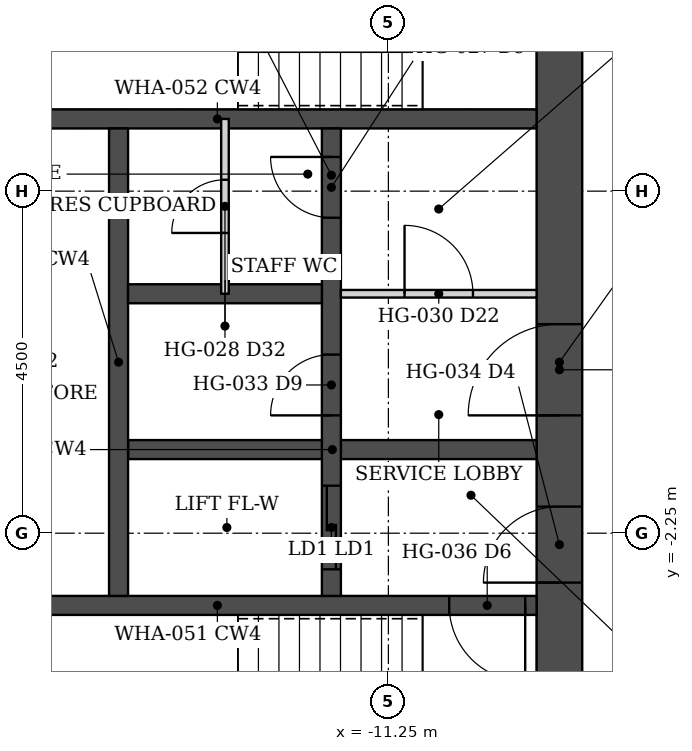
"""IFC4 building model, lengths in metres.
Left out: names, types, materials, properties, quantities, classifications, styles, units other than length and angle.
Written with IfcOpenShell. Run it as: python <this file> out.ifc"""

import sys

from ifc_helpers import new_model, si_unit, direction, frame, frame_2d, origin, place, context, subcontext, project, spatial, rectangle, extrude, element, fill, save


model = new_model("IFC4")
c1 = context("Model", 3, precision=1e-05, world=origin(), true_north=direction((0.0, 1.0)))
c2 = subcontext(c1, "Body", "Model", "MODEL_VIEW")
j1 = project(units=[si_unit("LENGTHUNIT", "METRE"), si_unit("PLANEANGLEUNIT", "RADIAN")], contexts=[c1])
p1 = place(None, origin())
s1 = spatial("IfcSite", under=j1, at=p1, CompositionType="ELEMENT")
p2 = place(p1, origin())
s2 = spatial("IfcBuilding", under=s1, at=p2, CompositionType="ELEMENT")
p3 = place(p2, frame((0.0, 0.0, 186.8)))
s3 = spatial("IfcBuildingStorey", under=s2, at=p3, CompositionType="ELEMENT", Elevation=186.8)
p4 = place(p3, frame((-9.0, -6.45, 0.0), z_axis=(0.0, 0.0, 1.0), x_axis=(0.0, 1.0, 0.0)))
e1 = element("IfcWall", 1, at=p4, inside=s3, PredefinedType="SHEAR", context=c2, shape_type="SweptSolid", body=[
    extrude(rectangle(XDim=12.9, YDim=0.6, at=frame_2d((6.45, 0.0))), origin(), (0.0, 0.0, 1.0), 3.6),
])
p5 = place(p4, frame((3.55, 0.0, 0.0)))
e2 = element("IfcOpeningElement", 2, at=p5, cuts=e1, PredefinedType="OPENING", context=c2, shape_type="SweptSolid", body=[
    extrude(rectangle(XDim=1.0, YDim=2.1, at=frame_2d((0.5, 1.05))), frame((0.0, 0.31, 0.0), z_axis=(0.0, -1.0, 0.0), x_axis=(1.0, 0.0, 0.0)), (0.0, 0.0, 1.0), 0.62),
])
p6 = place(p4, frame((5.75, 0.0, 0.0)))
e3 = element("IfcOpeningElement", 3, at=p6, cuts=e1, PredefinedType="OPENING", context=c2, shape_type="SweptSolid", body=[
    extrude(rectangle(XDim=1.2, YDim=2.1, at=frame_2d((0.6, 1.05))), frame((0.0, 0.31, 0.0), z_axis=(0.0, -1.0, 0.0), x_axis=(1.0, 0.0, 0.0)), (0.0, 0.0, 1.0), 0.62),
])
p7 = place(p4, frame((10.85, 0.0, 0.0)))
e4 = element("IfcOpeningElement", 4, at=p7, cuts=e1, PredefinedType="OPENING", context=c2, shape_type="SweptSolid", body=[
    extrude(rectangle(XDim=1.0, YDim=2.1, at=frame_2d((0.5, 1.05))), frame((0.0, 0.31, 0.0), z_axis=(0.0, -1.0, 0.0), x_axis=(1.0, 0.0, 0.0)), (0.0, 0.0, 1.0), 0.62),
])
p8 = place(p3, frame((-9.3, -3.2, 0.0), z_axis=(0.0, 0.0, 1.0), x_axis=(-1.0, 0.0, 0.0)))
e5 = element("IfcWall", 5, at=p8, inside=s3, PredefinedType="SHEAR", context=c2, shape_type="SweptSolid", body=[
    extrude(rectangle(XDim=8.4, YDim=0.25, at=frame_2d((4.2, 0.0))), origin(), (0.0, 0.0, 1.0), 3.6),
])
p9 = place(p8, frame((0.15, 0.0, 0.0)))
e6 = element("IfcOpeningElement", 6, at=p9, cuts=e5, PredefinedType="OPENING", context=c2, shape_type="SweptSolid", body=[
    extrude(rectangle(XDim=1.0, YDim=2.1, at=frame_2d((0.5, 1.05))), frame((0.0, 0.135, 0.0), z_axis=(0.0, -1.0, 0.0), x_axis=(1.0, 0.0, 0.0)), (0.0, 0.0, 1.0), 0.27),
])
p10 = place(p3, frame((-9.3, 3.2, 0.0), z_axis=(0.0, 0.0, 1.0), x_axis=(-1.0, 0.0, 0.0)))
e7 = element("IfcWall", 7, at=p10, inside=s3, PredefinedType="SHEAR", context=c2, shape_type="SweptSolid", body=[
    extrude(rectangle(XDim=8.4, YDim=0.25, at=frame_2d((4.2, 0.0))), origin(), (0.0, 0.0, 1.0), 3.6),
])
p11 = place(p3, frame((-9.3, -1.15, 0.0), z_axis=(0.0, 0.0, 1.0), x_axis=(-1.0, 0.0, 0.0)))
e8 = element("IfcWall", 8, at=p11, inside=s3, PredefinedType="SHEAR", context=c2, shape_type="SweptSolid", body=[
    extrude(rectangle(XDim=5.375, YDim=0.25, at=frame_2d((2.688, 0.0))), origin(), (0.0, 0.0, 1.0), 3.6),
])
p12 = place(p3, frame((-12.0, -3.075, 0.0), z_axis=(0.0, 0.0, 1.0), x_axis=(0.0, 1.0, 0.0)))
e9 = element("IfcWall", 9, at=p12, inside=s3, PredefinedType="SHEAR", context=c2, shape_type="SweptSolid", body=[
    extrude(rectangle(XDim=6.15, YDim=0.25, at=frame_2d((3.075, 0.0))), origin(), (0.0, 0.0, 1.0), 3.6),
])
p13 = place(p12, frame((2.375, 0.0, 0.0)))
e10 = element("IfcOpeningElement", 10, at=p13, cuts=e9, PredefinedType="OPENING", context=c2, shape_type="SweptSolid", body=[
    extrude(rectangle(XDim=0.8, YDim=2.1, at=frame_2d((0.4, 1.05))), frame((0.0, 0.135, 0.0), z_axis=(0.0, -1.0, 0.0), x_axis=(1.0, 0.0, 0.0)), (0.0, 0.0, 1.0), 0.27),
])
p14 = place(p12, frame((4.975, 0.0, 0.0)))
e11 = element("IfcOpeningElement", 11, at=p14, cuts=e9, PredefinedType="OPENING", context=c2, shape_type="SweptSolid", body=[
    extrude(rectangle(XDim=0.8, YDim=2.1, at=frame_2d((0.4, 1.05))), frame((0.0, 0.135, 0.0), z_axis=(0.0, -1.0, 0.0), x_axis=(1.0, 0.0, 0.0)), (0.0, 0.0, 1.0), 0.27),
])
p15 = place(p12, frame((0.35, 0.0, 0.0)))
e12 = element("IfcOpeningElement", 12, at=p15, cuts=e9, PredefinedType="OPENING", context=c2, shape_type="SweptSolid", body=[
    extrude(rectangle(XDim=1.1, YDim=2.1, at=frame_2d((0.55, 1.05))), frame((0.0, 0.135, 0.0), z_axis=(0.0, -1.0, 0.0), x_axis=(1.0, 0.0, 0.0)), (0.0, 0.0, 1.0), 0.27),
])
p16 = place(p3, frame((-14.8, -3.075, 0.0), z_axis=(0.0, 0.0, 1.0), x_axis=(0.0, 1.0, 0.0)))
e13 = element("IfcWall", 13, at=p16, inside=s3, PredefinedType="SHEAR", context=c2, shape_type="SweptSolid", body=[
    extrude(rectangle(XDim=6.15, YDim=0.25, at=frame_2d((3.075, 0.0))), origin(), (0.0, 0.0, 1.0), 3.6),
])
p17 = place(p3, frame((-12.125, 0.9, 0.0), z_axis=(0.0, 0.0, 1.0), x_axis=(-1.0, 0.0, 0.0)))
e14 = element("IfcWall", 14, at=p17, inside=s3, PredefinedType="SHEAR", context=c2, shape_type="SweptSolid", body=[
    extrude(rectangle(XDim=2.55, YDim=0.25, at=frame_2d((1.275, 0.0))), origin(), (0.0, 0.0, 1.0), 3.6),
])
p18 = place(p3, frame((-11.875, 0.9, 0.0), z_axis=(0.0, 0.0, 1.0), x_axis=(1.0, 0.0, 0.0)))
e15 = element("IfcWall", 15, at=p18, inside=s3, PredefinedType="PARTITIONING", context=c2, shape_type="SweptSolid", body=[
    extrude(rectangle(XDim=2.575, YDim=0.1, at=frame_2d((1.288, 0.0))), origin(), (0.0, 0.0, 1.0), 2.379),
])
p19 = place(p18, frame((0.837, 0.0, 0.0)))
e16 = element("IfcOpeningElement", 16, at=p19, cuts=e15, PredefinedType="OPENING", context=c2, shape_type="SweptSolid", body=[
    extrude(rectangle(XDim=0.9, YDim=2.1, at=frame_2d((0.45, 1.05))), frame((0.0, 0.06, 0.0), z_axis=(0.0, -1.0, 0.0), x_axis=(1.0, 0.0, 0.0)), (0.0, 0.0, 1.0), 0.12),
])
p20 = place(p3, frame((-13.4, 0.9, 0.0), z_axis=(0.0, 0.0, 1.0), x_axis=(0.0, 1.0, 0.0)))
e17 = element("IfcWall", 17, at=p20, inside=s3, PredefinedType="PARTITIONING", context=c2, shape_type="SweptSolid", body=[
    extrude(rectangle(XDim=2.3, YDim=0.1, at=frame_2d((1.15, 0.0))), origin(), (0.0, 0.0, 1.0), 2.379),
])
p21 = place(p20, frame((0.8, 0.0, 0.0)))
e18 = element("IfcOpeningElement", 18, at=p21, cuts=e17, PredefinedType="OPENING", context=c2, shape_type="SweptSolid", body=[
    extrude(rectangle(XDim=0.7, YDim=2.1, at=frame_2d((0.35, 1.05))), frame((0.0, 0.06, 0.0), z_axis=(0.0, -1.0, 0.0), x_axis=(1.0, 0.0, 0.0)), (0.0, 0.0, 1.0), 0.12),
])
p22 = place(p5, origin())
e19 = element("IfcDoor", 19, at=p22, inside=s3, OperationType="SINGLE_SWING_LEFT", PredefinedType="DOOR", context=c2, shape_type="SweptSolid", body=[
    extrude(rectangle(XDim=1.0, YDim=2.1, at=frame_2d((0.5, 1.05))), frame((0.0, 0.025, 0.0), z_axis=(0.0, -1.0, 0.0), x_axis=(1.0, 0.0, 0.0)), (0.0, 0.0, 1.0), 0.05),
])
fill(e2, e19)
p23 = place(p9, origin())
e20 = element("IfcDoor", 20, at=p23, inside=s3, OperationType="SINGLE_SWING_LEFT", PredefinedType="DOOR", context=c2, shape_type="SweptSolid", body=[
    extrude(rectangle(XDim=1.0, YDim=2.1, at=frame_2d((0.5, 1.05))), frame((0.0, 0.025, 0.0), z_axis=(0.0, -1.0, 0.0), x_axis=(1.0, 0.0, 0.0)), (0.0, 0.0, 1.0), 0.05),
])
fill(e6, e20)
p24 = place(p19, origin())
e21 = element("IfcDoor", 21, at=p24, inside=s3, OperationType="SINGLE_SWING_LEFT", PredefinedType="DOOR", context=c2, shape_type="SweptSolid", body=[
    extrude(rectangle(XDim=0.9, YDim=2.1, at=frame_2d((0.45, 1.05))), frame((0.0, 0.025, 0.0), z_axis=(0.0, -1.0, 0.0), x_axis=(1.0, 0.0, 0.0)), (0.0, 0.0, 1.0), 0.05),
])
fill(e16, e21)
p25 = place(p6, origin())
e22 = element("IfcDoor", 22, at=p25, inside=s3, OperationType="SINGLE_SWING_LEFT", PredefinedType="DOOR", context=c2, shape_type="SweptSolid", body=[
    extrude(rectangle(XDim=1.2, YDim=2.1, at=frame_2d((0.6, 1.05))), frame((0.0, 0.025, 0.0), z_axis=(0.0, -1.0, 0.0), x_axis=(1.0, 0.0, 0.0)), (0.0, 0.0, 1.0), 0.05),
])
fill(e3, e22)
p26 = place(p13, origin())
e23 = element("IfcDoor", 23, at=p26, inside=s3, OperationType="SINGLE_SWING_LEFT", PredefinedType="DOOR", context=c2, shape_type="SweptSolid", body=[
    extrude(rectangle(XDim=0.8, YDim=2.1, at=frame_2d((0.4, 1.05))), frame((0.0, 0.025, 0.0), z_axis=(0.0, -1.0, 0.0), x_axis=(1.0, 0.0, 0.0)), (0.0, 0.0, 1.0), 0.05),
])
fill(e10, e23)
p27 = place(p21, origin())
e24 = element("IfcDoor", 24, at=p27, inside=s3, OperationType="SINGLE_SWING_LEFT", PredefinedType="DOOR", context=c2, shape_type="SweptSolid", body=[
    extrude(rectangle(XDim=0.7, YDim=2.1, at=frame_2d((0.35, 1.05))), frame((0.0, 0.025, 0.0), z_axis=(0.0, -1.0, 0.0), x_axis=(1.0, 0.0, 0.0)), (0.0, 0.0, 1.0), 0.05),
])
fill(e18, e24)
p28 = place(p14, origin())
e25 = element("IfcDoor", 25, at=p28, inside=s3, OperationType="SINGLE_SWING_RIGHT", PredefinedType="DOOR", context=c2, shape_type="SweptSolid", body=[
    extrude(rectangle(XDim=0.8, YDim=2.1, at=frame_2d((0.4, 1.05))), frame((0.0, 0.025, 0.0), z_axis=(0.0, -1.0, 0.0), x_axis=(1.0, 0.0, 0.0)), (0.0, 0.0, 1.0), 0.05),
])
fill(e11, e25)
p29 = place(p15, origin())
e26 = element("IfcDoor", 26, at=p29, inside=s3, OperationType="DOUBLE_DOOR_SLIDING", PredefinedType="DOOR", context=c2, shape_type="SweptSolid", body=[
    extrude(rectangle(XDim=1.1, YDim=2.1, at=frame_2d((0.55, 1.05))), frame((0.0, 0.025, 0.0), z_axis=(0.0, -1.0, 0.0), x_axis=(1.0, 0.0, 0.0)), (0.0, 0.0, 1.0), 0.05),
])
fill(e12, e26)
save(model, sys.argv[1])
